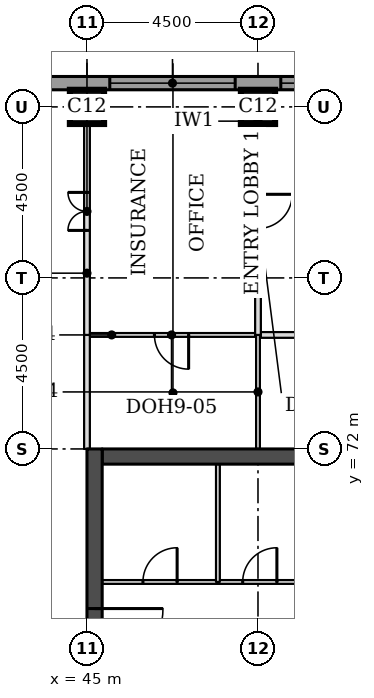
"""IFC4 building model, lengths in metres.
Left out: names, types, materials, properties, quantities, classifications, styles, units other than length and angle.
Written with IfcOpenShell. Run it as: python <this file> out.ifc"""

import sys

from ifc_helpers import new_model, si_unit, direction, frame, frame_2d, origin, origin_2d, place, context, subcontext, project, spatial, rectangle, extrude, element, fill, save


model = new_model("IFC4")
c1 = context("Model", 3, precision=1e-05, world=origin(), true_north=direction((0.0, 1.0)))
c2 = subcontext(c1, "Body", "Model", "MODEL_VIEW")
j1 = project(units=[si_unit("LENGTHUNIT", "METRE"), si_unit("PLANEANGLEUNIT", "RADIAN")], contexts=[c1])
p1 = place(None, origin())
s1 = spatial("IfcSite", under=j1, at=p1, CompositionType="ELEMENT")
p2 = place(p1, origin())
s2 = spatial("IfcBuilding", under=s1, at=p2, CompositionType="ELEMENT")
p3 = place(p2, frame((0.0, 0.0, 219.3)))
s3 = spatial("IfcBuildingStorey", under=s2, at=p3, CompositionType="ELEMENT", Elevation=219.3)
for number, where, z_axis, x_axis in (
    (1, (45.0, 81.0, 0.0), (0.0, 0.0, 1.0), (1.0, 0.0, 0.0)),
    (2, (49.5, 81.0, 0.0), (0.0, 0.0, 1.0), (1.0, 0.0, 0.0)),
):
    element("IfcColumn", number, at=place(p3, frame(where, z_axis=z_axis, x_axis=x_axis)), inside=s3, PredefinedType="COLUMN", context=c2, shape_type="SweptSolid", body=[
        extrude(rectangle(XDim=0.9, YDim=0.9, at=origin_2d()), origin(), (0.0, 0.0, 1.0), 3.7),
    ])
p4 = place(p3, frame((45.4, 71.8, 0.0), z_axis=(0.0, 0.0, 1.0), x_axis=(1.0, 0.0, 0.0)))
e3 = element("IfcWall", 3, at=p4, inside=s3, PredefinedType="SHEAR", context=c2, shape_type="SweptSolid", body=[
    extrude(rectangle(XDim=21.7, YDim=0.4, at=frame_2d((10.85, 0.0))), origin(), (0.0, 0.0, 1.0), 3.7),
])
p5 = place(p3, frame((45.2, 49.5, 0.0), z_axis=(0.0, 0.0, 1.0), x_axis=(0.0, 1.0, 0.0)))
e4 = element("IfcWall", 4, at=p5, inside=s3, PredefinedType="SHEAR", context=c2, shape_type="SweptSolid", body=[
    extrude(rectangle(XDim=22.5, YDim=0.4, at=frame_2d((11.25, 0.0))), origin(), (0.0, 0.0, 1.0), 3.7),
])
p6 = place(p5, frame((4.2, 0.0, 0.0)))
e5 = element("IfcOpeningElement", 5, at=p6, cuts=e4, PredefinedType="OPENING", context=c2, shape_type="SweptSolid", body=[
    extrude(rectangle(XDim=1.8, YDim=2.1, at=frame_2d((0.9, 1.05))), frame((0.0, 0.21, 0.0), z_axis=(0.0, -1.0, 0.0), x_axis=(1.0, 0.0, 0.0)), (0.0, 0.0, 1.0), 0.42),
])
p7 = place(p5, frame((6.9, 0.0, 0.0)))
e6 = element("IfcOpeningElement", 6, at=p7, cuts=e4, PredefinedType="OPENING", context=c2, shape_type="SweptSolid", body=[
    extrude(rectangle(XDim=1.1, YDim=2.1, at=frame_2d((0.55, 1.05))), frame((0.0, 0.21, 0.0), z_axis=(0.0, -1.0, 0.0), x_axis=(1.0, 0.0, 0.0)), (0.0, 0.0, 1.0), 0.42),
])
p8 = place(p5, frame((13.6, 0.0, 0.0)))
e7 = element("IfcOpeningElement", 7, at=p8, cuts=e4, PredefinedType="OPENING", context=c2, shape_type="SweptSolid", body=[
    extrude(rectangle(XDim=1.1, YDim=2.1, at=frame_2d((0.55, 1.05))), frame((0.0, 0.21, 0.0), z_axis=(0.0, -1.0, 0.0), x_axis=(1.0, 0.0, 0.0)), (0.0, 0.0, 1.0), 0.42),
])
p9 = place(p5, frame((16.5, 0.0, 0.0)))
e8 = element("IfcOpeningElement", 8, at=p9, cuts=e4, PredefinedType="OPENING", context=c2, shape_type="SweptSolid", body=[
    extrude(rectangle(XDim=1.8, YDim=2.1, at=frame_2d((0.9, 1.05))), frame((0.0, 0.21, 0.0), z_axis=(0.0, -1.0, 0.0), x_axis=(1.0, 0.0, 0.0)), (0.0, 0.0, 1.0), 0.42),
])
p10 = place(p3, frame((72.331, 81.625, 0.0), z_axis=(0.0, 0.0, 1.0), x_axis=(-1.0, 0.0, 0.0)))
e9 = element("IfcWall", 9, at=p10, inside=s3, PredefinedType="STANDARD", context=c2, shape_type="SweptSolid", body=[
    extrude(rectangle(XDim=32.163, YDim=0.35, at=frame_2d((16.081, 0.0))), origin(), (0.0, 0.0, 1.0), 3.525),
])
p11 = place(p10, frame((5.431, 0.0, 0.9)))
e10 = element("IfcOpeningElement", 10, at=p11, cuts=e9, PredefinedType="OPENING", context=c2, shape_type="SweptSolid", body=[
    extrude(rectangle(XDim=3.3, YDim=1.9, at=frame_2d((1.65, 0.95))), frame((0.0, 0.185, 0.0), z_axis=(0.0, -1.0, 0.0), x_axis=(1.0, 0.0, 0.0)), (0.0, 0.0, 1.0), 0.37),
])
p12 = place(p10, frame((9.931, 0.0, 0.9)))
e11 = element("IfcOpeningElement", 11, at=p12, cuts=e9, PredefinedType="OPENING", context=c2, shape_type="SweptSolid", body=[
    extrude(rectangle(XDim=3.3, YDim=1.9, at=frame_2d((1.65, 0.95))), frame((0.0, 0.185, 0.0), z_axis=(0.0, -1.0, 0.0), x_axis=(1.0, 0.0, 0.0)), (0.0, 0.0, 1.0), 0.37),
])
p13 = place(p10, frame((14.431, 0.0, 0.9)))
e12 = element("IfcOpeningElement", 12, at=p13, cuts=e9, PredefinedType="OPENING", context=c2, shape_type="SweptSolid", body=[
    extrude(rectangle(XDim=3.3, YDim=1.9, at=frame_2d((1.65, 0.95))), frame((0.0, 0.185, 0.0), z_axis=(0.0, -1.0, 0.0), x_axis=(1.0, 0.0, 0.0)), (0.0, 0.0, 1.0), 0.37),
])
p14 = place(p10, frame((18.931, 0.0, 0.9)))
e13 = element("IfcOpeningElement", 13, at=p14, cuts=e9, PredefinedType="OPENING", context=c2, shape_type="SweptSolid", body=[
    extrude(rectangle(XDim=3.3, YDim=1.9, at=frame_2d((1.65, 0.95))), frame((0.0, 0.185, 0.0), z_axis=(0.0, -1.0, 0.0), x_axis=(1.0, 0.0, 0.0)), (0.0, 0.0, 1.0), 0.37),
])
p15 = place(p10, frame((23.431, 0.0, 0.9)))
e14 = element("IfcOpeningElement", 14, at=p15, cuts=e9, PredefinedType="OPENING", context=c2, shape_type="SweptSolid", body=[
    extrude(rectangle(XDim=3.3, YDim=1.9, at=frame_2d((1.65, 0.95))), frame((0.0, 0.185, 0.0), z_axis=(0.0, -1.0, 0.0), x_axis=(1.0, 0.0, 0.0)), (0.0, 0.0, 1.0), 0.37),
])
p16 = place(p3, frame((45.075, 75.0, 0.0), z_axis=(0.0, 0.0, 1.0), x_axis=(1.0, 0.0, 0.0)))
e15 = element("IfcWall", 15, at=p16, inside=s3, PredefinedType="PARTITIONING", context=c2, shape_type="SweptSolid", body=[
    extrude(rectangle(XDim=4.35, YDim=0.1, at=frame_2d((2.175, 0.0))), origin(), (0.0, 0.0, 1.0), 3.55),
])
p17 = place(p16, frame((1.7, 0.0, 0.0)))
e16 = element("IfcOpeningElement", 16, at=p17, cuts=e15, PredefinedType="OPENING", context=c2, shape_type="SweptSolid", body=[
    extrude(rectangle(XDim=0.9, YDim=2.1, at=frame_2d((0.45, 1.05))), frame((0.0, 0.06, 0.0), z_axis=(0.0, -1.0, 0.0), x_axis=(1.0, 0.0, 0.0)), (0.0, 0.0, 1.0), 0.12),
])
p18 = place(p3, frame((49.575, 75.0, 0.0), z_axis=(0.0, 0.0, 1.0), x_axis=(1.0, 0.0, 0.0)))
e17 = element("IfcWall", 17, at=p18, inside=s3, PredefinedType="PARTITIONING", context=c2, shape_type="SweptSolid", body=[
    extrude(rectangle(XDim=4.5, YDim=0.15, at=frame_2d((2.25, 0.0))), origin(), (0.0, 0.0, 1.0), 3.55),
])
p19 = place(p18, frame((1.8, 0.0, 0.0)))
e18 = element("IfcOpeningElement", 18, at=p19, cuts=e17, PredefinedType="OPENING", context=c2, shape_type="SweptSolid", body=[
    extrude(rectangle(XDim=0.9, YDim=2.1, at=frame_2d((0.45, 1.05))), frame((0.0, 0.085, 0.0), z_axis=(0.0, -1.0, 0.0), x_axis=(1.0, 0.0, 0.0)), (0.0, 0.0, 1.0), 0.17),
])
p20 = place(p3, frame((45.0, 72.0, 0.0), z_axis=(0.0, 0.0, 1.0), x_axis=(0.0, 1.0, 0.0)))
e19 = element("IfcWall", 19, at=p20, inside=s3, PredefinedType="PARTITIONING", context=c2, shape_type="SweptSolid", body=[
    extrude(rectangle(XDim=3.0, YDim=0.15, at=frame_2d((1.5, 0.0))), origin(), (0.0, 0.0, 1.0), 3.022),
])
p21 = place(p3, frame((49.5, 72.0, 0.0), z_axis=(0.0, 0.0, 1.0), x_axis=(0.0, 1.0, 0.0)))
e20 = element("IfcWall", 20, at=p21, inside=s3, PredefinedType="PARTITIONING", context=c2, shape_type="SweptSolid", body=[
    extrude(rectangle(XDim=3.0, YDim=0.1, at=frame_2d((1.5, 0.0))), origin(), (0.0, 0.0, 1.0), 3.55),
])
p22 = place(p3, frame((45.0, 75.0, 0.0), z_axis=(0.0, 0.0, 1.0), x_axis=(0.0, 1.0, 0.0)))
e21 = element("IfcWall", 21, at=p22, inside=s3, PredefinedType="PARTITIONING", context=c2, shape_type="SweptSolid", body=[
    extrude(rectangle(XDim=6.45, YDim=0.15, at=frame_2d((3.225, 0.0))), origin(), (0.0, 0.0, 1.0), 3.022),
])
p23 = place(p22, frame((2.75, 0.0, 0.0)))
e22 = element("IfcOpeningElement", 22, at=p23, cuts=e21, PredefinedType="OPENING", context=c2, shape_type="SweptSolid", body=[
    extrude(rectangle(XDim=1.0, YDim=2.1, at=frame_2d((0.5, 1.05))), frame((0.0, 0.085, 0.0), z_axis=(0.0, -1.0, 0.0), x_axis=(1.0, 0.0, 0.0)), (0.0, 0.0, 1.0), 0.17),
])
p24 = place(p3, frame((49.5, 75.0, 0.0), z_axis=(0.0, 0.0, 1.0), x_axis=(0.0, 1.0, 0.0)))
e23 = element("IfcWall", 23, at=p24, inside=s3, PredefinedType="PARTITIONING", context=c2, shape_type="SweptSolid", body=[
    extrude(rectangle(XDim=6.45, YDim=0.15, at=frame_2d((3.225, 0.0))), origin(), (0.0, 0.0, 1.0), 3.55),
])
p25 = place(p24, frame((2.8, 0.0, 0.0)))
e24 = element("IfcOpeningElement", 24, at=p25, cuts=e23, PredefinedType="OPENING", context=c2, shape_type="SweptSolid", body=[
    extrude(rectangle(XDim=0.9, YDim=2.1, at=frame_2d((0.45, 1.05))), frame((0.0, 0.085, 0.0), z_axis=(0.0, -1.0, 0.0), x_axis=(1.0, 0.0, 0.0)), (0.0, 0.0, 1.0), 0.17),
])
p26 = place(p3, frame((45.4, 68.5, 0.0), z_axis=(0.0, 0.0, 1.0), x_axis=(1.0, 0.0, 0.0)))
e25 = element("IfcWall", 25, at=p26, inside=s3, PredefinedType="PARTITIONING", context=c2, shape_type="SweptSolid", body=[
    extrude(rectangle(XDim=21.7, YDim=0.1, at=frame_2d((10.85, 0.0))), origin(), (0.0, 0.0, 1.0), 3.55),
])
p27 = place(p26, frame((18.625, 0.0, 0.0)))
e26 = element("IfcOpeningElement", 26, at=p27, cuts=e25, PredefinedType="OPENING", context=c2, shape_type="SweptSolid", body=[
    extrude(rectangle(XDim=0.9, YDim=2.1, at=frame_2d((0.45, 1.05))), frame((0.0, 0.06, 0.0), z_axis=(0.0, -1.0, 0.0), x_axis=(1.0, 0.0, 0.0)), (0.0, 0.0, 1.0), 0.12),
])
p28 = place(p26, frame((1.073, 0.0, 0.0)))
e27 = element("IfcOpeningElement", 27, at=p28, cuts=e25, PredefinedType="OPENING", context=c2, shape_type="SweptSolid", body=[
    extrude(rectangle(XDim=0.9, YDim=2.1, at=frame_2d((0.45, 1.05))), frame((0.0, 0.06, 0.0), z_axis=(0.0, -1.0, 0.0), x_axis=(1.0, 0.0, 0.0)), (0.0, 0.0, 1.0), 0.12),
])
p29 = place(p26, frame((3.698, 0.0, 0.0)))
e28 = element("IfcOpeningElement", 28, at=p29, cuts=e25, PredefinedType="OPENING", context=c2, shape_type="SweptSolid", body=[
    extrude(rectangle(XDim=0.9, YDim=2.1, at=frame_2d((0.45, 1.05))), frame((0.0, 0.06, 0.0), z_axis=(0.0, -1.0, 0.0), x_axis=(1.0, 0.0, 0.0)), (0.0, 0.0, 1.0), 0.12),
])
p30 = place(p26, frame((13.48, 0.0, 0.0)))
e29 = element("IfcOpeningElement", 29, at=p30, cuts=e25, PredefinedType="OPENING", context=c2, shape_type="SweptSolid", body=[
    extrude(rectangle(XDim=0.9, YDim=2.1, at=frame_2d((0.45, 1.05))), frame((0.0, 0.06, 0.0), z_axis=(0.0, -1.0, 0.0), x_axis=(1.0, 0.0, 0.0)), (0.0, 0.0, 1.0), 0.12),
])
p31 = place(p26, frame((7.88, 0.0, 0.0)))
e30 = element("IfcOpeningElement", 30, at=p31, cuts=e25, PredefinedType="OPENING", context=c2, shape_type="SweptSolid", body=[
    extrude(rectangle(XDim=0.9, YDim=2.1, at=frame_2d((0.45, 1.05))), frame((0.0, 0.06, 0.0), z_axis=(0.0, -1.0, 0.0), x_axis=(1.0, 0.0, 0.0)), (0.0, 0.0, 1.0), 0.12),
])
p32 = place(p3, frame((48.445, 68.5, 0.0), z_axis=(0.0, 0.0, 1.0), x_axis=(0.0, 1.0, 0.0)))
e31 = element("IfcWall", 31, at=p32, inside=s3, PredefinedType="PARTITIONING", context=c2, shape_type="SweptSolid", body=[
    extrude(rectangle(XDim=3.1, YDim=0.1, at=frame_2d((1.55, 0.0))), origin(), (0.0, 0.0, 1.0), 3.55),
])
p33 = place(p14, origin())
e32 = element("IfcWindow", 32, at=p33, inside=s3, PartitioningType="SINGLE_PANEL", PredefinedType="WINDOW", context=c2, shape_type="SweptSolid", body=[
    extrude(rectangle(XDim=3.3, YDim=1.9, at=frame_2d((1.65, 0.95))), frame((0.0, 0.085, 0.0), z_axis=(0.0, -1.0, 0.0), x_axis=(1.0, 0.0, 0.0)), (0.0, 0.0, 1.0), 0.06),
])
fill(e13, e32)
p34 = place(p15, origin())
e33 = element("IfcWindow", 33, at=p34, inside=s3, PartitioningType="SINGLE_PANEL", PredefinedType="WINDOW", context=c2, shape_type="SweptSolid", body=[
    extrude(rectangle(XDim=3.3, YDim=1.9, at=frame_2d((1.65, 0.95))), frame((0.0, 0.085, 0.0), z_axis=(0.0, -1.0, 0.0), x_axis=(1.0, 0.0, 0.0)), (0.0, 0.0, 1.0), 0.06),
])
fill(e14, e33)
p35 = place(p23, origin())
e34 = element("IfcDoor", 34, at=p35, inside=s3, OperationType="DOUBLE_DOOR_SINGLE_SWING", PredefinedType="DOOR", context=c2, shape_type="SweptSolid", body=[
    extrude(rectangle(XDim=1.0, YDim=2.1, at=frame_2d((0.5, 1.05))), frame((0.0, 0.025, 0.0), z_axis=(0.0, -1.0, 0.0), x_axis=(1.0, 0.0, 0.0)), (0.0, 0.0, 1.0), 0.05),
])
fill(e22, e34)
p36 = place(p25, frame((0.9, 0.0, 0.0), z_axis=(0.0, 0.0, 1.0), x_axis=(-1.0, 0.0, 0.0)))
e35 = element("IfcDoor", 35, at=p36, inside=s3, OperationType="SINGLE_SWING_LEFT", PredefinedType="DOOR", context=c2, shape_type="SweptSolid", body=[
    extrude(rectangle(XDim=0.9, YDim=2.1, at=frame_2d((0.45, 1.05))), frame((0.0, 0.025, 0.0), z_axis=(0.0, -1.0, 0.0), x_axis=(1.0, 0.0, 0.0)), (0.0, 0.0, 1.0), 0.05),
])
fill(e24, e35)
p37 = place(p17, frame((0.9, 0.0, 0.0), z_axis=(0.0, 0.0, 1.0), x_axis=(-1.0, 0.0, 0.0)))
e36 = element("IfcDoor", 36, at=p37, inside=s3, OperationType="SINGLE_SWING_LEFT", PredefinedType="DOOR", context=c2, shape_type="SweptSolid", body=[
    extrude(rectangle(XDim=0.9, YDim=2.1, at=frame_2d((0.45, 1.05))), frame((0.0, 0.025, 0.0), z_axis=(0.0, -1.0, 0.0), x_axis=(1.0, 0.0, 0.0)), (0.0, 0.0, 1.0), 0.05),
])
fill(e16, e36)
p38 = place(p9, frame((1.8, 0.0, 0.0), z_axis=(0.0, 0.0, 1.0), x_axis=(-1.0, 0.0, 0.0)))
e37 = element("IfcDoor", 37, at=p38, inside=s3, OperationType="SINGLE_SWING_LEFT", PredefinedType="DOOR", context=c2, shape_type="SweptSolid", body=[
    extrude(rectangle(XDim=1.8, YDim=2.1, at=frame_2d((0.9, 1.05))), frame((0.0, 0.025, 0.0), z_axis=(0.0, -1.0, 0.0), x_axis=(1.0, 0.0, 0.0)), (0.0, 0.0, 1.0), 0.05),
])
fill(e8, e37)
p39 = place(p28, origin())
e38 = element("IfcDoor", 38, at=p39, inside=s3, OperationType="SINGLE_SWING_RIGHT", PredefinedType="DOOR", context=c2, shape_type="SweptSolid", body=[
    extrude(rectangle(XDim=0.9, YDim=2.1, at=frame_2d((0.45, 1.05))), frame((0.0, 0.025, 0.0), z_axis=(0.0, -1.0, 0.0), x_axis=(1.0, 0.0, 0.0)), (0.0, 0.0, 1.0), 0.05),
])
fill(e27, e38)
p40 = place(p29, origin())
e39 = element("IfcDoor", 39, at=p40, inside=s3, OperationType="SINGLE_SWING_RIGHT", PredefinedType="DOOR", context=c2, shape_type="SweptSolid", body=[
    extrude(rectangle(XDim=0.9, YDim=2.1, at=frame_2d((0.45, 1.05))), frame((0.0, 0.025, 0.0), z_axis=(0.0, -1.0, 0.0), x_axis=(1.0, 0.0, 0.0)), (0.0, 0.0, 1.0), 0.05),
])
fill(e28, e39)
save(model, sys.argv[1])
